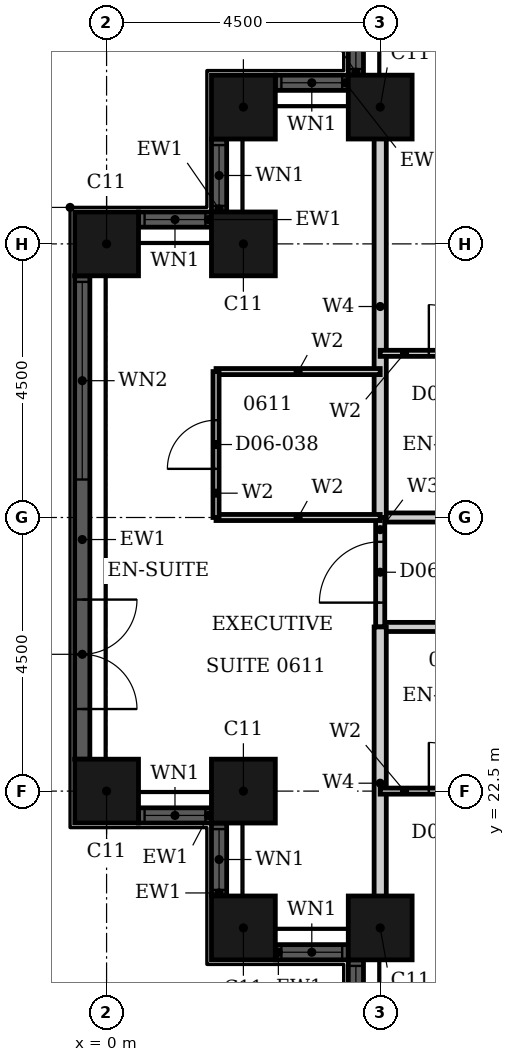
"""IFC4 building model, lengths in metres.
Left out: names, types, materials, properties, quantities, classifications, styles, units other than length and angle.
Written with IfcOpenShell. Run it as: python <this file> out.ifc"""

import sys

from ifc_helpers import new_model, si_unit, direction, frame, frame_2d, origin, origin_2d, place, context, subcontext, project, spatial, rectangle, hollow_rectangle, extrude, element, fill, save


model = new_model("IFC4")
c1 = context("Model", 3, precision=1e-05, world=origin(), true_north=direction((0.0, 1.0)))
c2 = subcontext(c1, "Body", "Model", "MODEL_VIEW")
j1 = project(units=[si_unit("LENGTHUNIT", "METRE"), si_unit("PLANEANGLEUNIT", "RADIAN")], contexts=[c1])
p1 = place(None, origin())
s1 = spatial("IfcSite", under=j1, at=p1, CompositionType="ELEMENT")
p2 = place(p1, origin())
s2 = spatial("IfcBuilding", under=s1, at=p2, CompositionType="ELEMENT")
p3 = place(p2, frame((0.0, 0.0, 33.6)))
s3 = spatial("IfcBuildingStorey", under=s2, at=p3, CompositionType="ELEMENT", Elevation=33.6)
for number, where, z_axis, x_axis in (
    (1, (4.5, 33.75, 0.0), (0.0, 0.0, 1.0), (1.0, 0.0, 0.0)),
    (2, (2.25, 33.75, 0.0), (0.0, 0.0, 1.0), (1.0, 0.0, 0.0)),
    (3, (2.25, 31.5, 0.0), (0.0, 0.0, 1.0), (1.0, 0.0, 0.0)),
    (4, (0.0, 31.5, 0.0), (0.0, 0.0, 1.0), (1.0, 0.0, 0.0)),
    (5, (0.0, 22.5, 0.0), (0.0, 0.0, 1.0), (1.0, 0.0, 0.0)),
    (6, (2.25, 22.5, 0.0), (0.0, 0.0, 1.0), (1.0, 0.0, 0.0)),
    (7, (2.25, 20.25, 0.0), (0.0, 0.0, 1.0), (1.0, 0.0, 0.0)),
    (8, (4.5, 20.25, 0.0), (0.0, 0.0, 1.0), (1.0, 0.0, 0.0)),
):
    element("IfcColumn", number, at=place(p3, frame(where, z_axis=z_axis, x_axis=x_axis)), inside=s3, PredefinedType="COLUMN", context=c2, shape_type="SweptSolid", body=[
        extrude(hollow_rectangle(XDim=1.05, YDim=1.05, WallThickness=0.034, at=origin_2d()), origin(), (0.0, 0.0, 1.0), 3.6),
    ])
p4 = place(p3, frame((4.1, 35.475, 0.0), z_axis=(0.0, 0.0, 1.0), x_axis=(0.0, -1.0, 0.0)))
e9 = element("IfcWall", 9, at=p4, inside=s3, PredefinedType="SOLIDWALL", context=c2, shape_type="SweptSolid", body=[
    extrude(rectangle(XDim=1.2, YDim=0.25, at=frame_2d((0.6, 0.0))), origin(), (0.0, 0.0, 1.0), 3.6),
])
p5 = place(p4, frame((0.1, 0.0, 0.9)))
e10 = element("IfcOpeningElement", 10, at=p5, cuts=e9, PredefinedType="OPENING", context=c2, shape_type="SweptSolid", body=[
    extrude(rectangle(XDim=1.0, YDim=2.08, at=frame_2d((0.5, 1.04))), frame((0.0, 0.135, 0.0), z_axis=(0.0, -1.0, 0.0), x_axis=(1.0, 0.0, 0.0)), (0.0, 0.0, 1.0), 0.27),
])
p6 = place(p3, frame((3.975, 34.15, 0.0), z_axis=(0.0, 0.0, 1.0), x_axis=(-1.0, 0.0, 0.0)))
e11 = element("IfcWall", 11, at=p6, inside=s3, PredefinedType="SOLIDWALL", context=c2, shape_type="SweptSolid", body=[
    extrude(rectangle(XDim=1.2, YDim=0.25, at=frame_2d((0.6, 0.0))), origin(), (0.0, 0.0, 1.0), 3.6),
])
p7 = place(p6, frame((0.1, 0.0, 0.9)))
e12 = element("IfcOpeningElement", 12, at=p7, cuts=e11, PredefinedType="OPENING", context=c2, shape_type="SweptSolid", body=[
    extrude(rectangle(XDim=1.0, YDim=2.08, at=frame_2d((0.5, 1.04))), frame((0.0, 0.135, 0.0), z_axis=(0.0, -1.0, 0.0), x_axis=(1.0, 0.0, 0.0)), (0.0, 0.0, 1.0), 0.27),
])
p8 = place(p3, frame((1.85, 33.225, 0.0), z_axis=(0.0, 0.0, 1.0), x_axis=(0.0, -1.0, 0.0)))
e13 = element("IfcWall", 13, at=p8, inside=s3, PredefinedType="SOLIDWALL", context=c2, shape_type="SweptSolid", body=[
    extrude(rectangle(XDim=1.2, YDim=0.25, at=frame_2d((0.6, 0.0))), origin(), (0.0, 0.0, 1.0), 3.6),
])
p9 = place(p8, frame((0.1, 0.0, 0.9)))
e14 = element("IfcOpeningElement", 14, at=p9, cuts=e13, PredefinedType="OPENING", context=c2, shape_type="SweptSolid", body=[
    extrude(rectangle(XDim=1.0, YDim=2.08, at=frame_2d((0.5, 1.04))), frame((0.0, 0.135, 0.0), z_axis=(0.0, -1.0, 0.0), x_axis=(1.0, 0.0, 0.0)), (0.0, 0.0, 1.0), 0.27),
])
p10 = place(p3, frame((1.725, 31.9, 0.0), z_axis=(0.0, 0.0, 1.0), x_axis=(-1.0, 0.0, 0.0)))
e15 = element("IfcWall", 15, at=p10, inside=s3, PredefinedType="SOLIDWALL", context=c2, shape_type="SweptSolid", body=[
    extrude(rectangle(XDim=1.2, YDim=0.25, at=frame_2d((0.6, 0.0))), origin(), (0.0, 0.0, 1.0), 3.6),
])
p11 = place(p10, frame((0.1, 0.0, 0.9)))
e16 = element("IfcOpeningElement", 16, at=p11, cuts=e15, PredefinedType="OPENING", context=c2, shape_type="SweptSolid", body=[
    extrude(rectangle(XDim=1.0, YDim=2.08, at=frame_2d((0.5, 1.04))), frame((0.0, 0.135, 0.0), z_axis=(0.0, -1.0, 0.0), x_axis=(1.0, 0.0, 0.0)), (0.0, 0.0, 1.0), 0.27),
])
p12 = place(p3, frame((-0.4, 30.975, 0.0), z_axis=(0.0, 0.0, 1.0), x_axis=(0.0, -1.0, 0.0)))
e17 = element("IfcWall", 17, at=p12, inside=s3, PredefinedType="SOLIDWALL", context=c2, shape_type="SweptSolid", body=[
    extrude(rectangle(XDim=7.95, YDim=0.25, at=frame_2d((3.975, 0.0))), origin(), (0.0, 0.0, 1.0), 3.6),
])
p13 = place(p12, frame((0.1, 0.0, 0.9)))
e18 = element("IfcOpeningElement", 18, at=p13, cuts=e17, PredefinedType="OPENING", context=c2, shape_type="SweptSolid", body=[
    extrude(rectangle(XDim=3.25, YDim=2.08, at=frame_2d((1.625, 1.04))), frame((0.0, 0.135, 0.0), z_axis=(0.0, -1.0, 0.0), x_axis=(1.0, 0.0, 0.0)), (0.0, 0.0, 1.0), 0.27),
])
p14 = place(p12, frame((5.325, 0.0, 0.0)))
e19 = element("IfcOpeningElement", 19, at=p14, cuts=e17, PredefinedType="OPENING", context=c2, shape_type="SweptSolid", body=[
    extrude(rectangle(XDim=1.8, YDim=2.4, at=frame_2d((0.9, 1.2))), frame((0.0, 0.135, 0.0), z_axis=(0.0, -1.0, 0.0), x_axis=(1.0, 0.0, 0.0)), (0.0, 0.0, 1.0), 0.27),
])
p15 = place(p3, frame((0.525, 22.1, 0.0), z_axis=(0.0, 0.0, 1.0), x_axis=(1.0, 0.0, 0.0)))
e20 = element("IfcWall", 20, at=p15, inside=s3, PredefinedType="SOLIDWALL", context=c2, shape_type="SweptSolid", body=[
    extrude(rectangle(XDim=1.2, YDim=0.25, at=frame_2d((0.6, 0.0))), origin(), (0.0, 0.0, 1.0), 3.6),
])
p16 = place(p15, frame((0.1, 0.0, 0.9)))
e21 = element("IfcOpeningElement", 21, at=p16, cuts=e20, PredefinedType="OPENING", context=c2, shape_type="SweptSolid", body=[
    extrude(rectangle(XDim=1.0, YDim=2.08, at=frame_2d((0.5, 1.04))), frame((0.0, 0.135, 0.0), z_axis=(0.0, -1.0, 0.0), x_axis=(1.0, 0.0, 0.0)), (0.0, 0.0, 1.0), 0.27),
])
p17 = place(p3, frame((1.85, 21.975, 0.0), z_axis=(0.0, 0.0, 1.0), x_axis=(0.0, -1.0, 0.0)))
e22 = element("IfcWall", 22, at=p17, inside=s3, PredefinedType="SOLIDWALL", context=c2, shape_type="SweptSolid", body=[
    extrude(rectangle(XDim=1.2, YDim=0.25, at=frame_2d((0.6, 0.0))), origin(), (0.0, 0.0, 1.0), 3.6),
])
p18 = place(p17, frame((0.1, 0.0, 0.9)))
e23 = element("IfcOpeningElement", 23, at=p18, cuts=e22, PredefinedType="OPENING", context=c2, shape_type="SweptSolid", body=[
    extrude(rectangle(XDim=1.0, YDim=2.08, at=frame_2d((0.5, 1.04))), frame((0.0, 0.135, 0.0), z_axis=(0.0, -1.0, 0.0), x_axis=(1.0, 0.0, 0.0)), (0.0, 0.0, 1.0), 0.27),
])
p19 = place(p3, frame((2.775, 19.85, 0.0), z_axis=(0.0, 0.0, 1.0), x_axis=(1.0, 0.0, 0.0)))
e24 = element("IfcWall", 24, at=p19, inside=s3, PredefinedType="SOLIDWALL", context=c2, shape_type="SweptSolid", body=[
    extrude(rectangle(XDim=1.2, YDim=0.25, at=frame_2d((0.6, 0.0))), origin(), (0.0, 0.0, 1.0), 3.6),
])
p20 = place(p19, frame((0.1, 0.0, 0.9)))
e25 = element("IfcOpeningElement", 25, at=p20, cuts=e24, PredefinedType="OPENING", context=c2, shape_type="SweptSolid", body=[
    extrude(rectangle(XDim=1.0, YDim=2.08, at=frame_2d((0.5, 1.04))), frame((0.0, 0.135, 0.0), z_axis=(0.0, -1.0, 0.0), x_axis=(1.0, 0.0, 0.0)), (0.0, 0.0, 1.0), 0.27),
])
p21 = place(p3, frame((4.1, 19.725, 0.0), z_axis=(0.0, 0.0, 1.0), x_axis=(0.0, -1.0, 0.0)))
e26 = element("IfcWall", 26, at=p21, inside=s3, PredefinedType="SOLIDWALL", context=c2, shape_type="SweptSolid", body=[
    extrude(rectangle(XDim=1.2, YDim=0.25, at=frame_2d((0.6, 0.0))), origin(), (0.0, 0.0, 1.0), 3.6),
])
p22 = place(p21, frame((0.1, 0.0, 0.9)))
e27 = element("IfcOpeningElement", 27, at=p22, cuts=e26, PredefinedType="OPENING", context=c2, shape_type="SweptSolid", body=[
    extrude(rectangle(XDim=1.0, YDim=2.08, at=frame_2d((0.5, 1.04))), frame((0.0, 0.135, 0.0), z_axis=(0.0, -1.0, 0.0), x_axis=(1.0, 0.0, 0.0)), (0.0, 0.0, 1.0), 0.27),
])
p23 = place(p3, frame((4.5, 25.2, 0.0), z_axis=(0.0, 0.0, 1.0), x_axis=(1.0, 0.0, 0.0)))
e28 = element("IfcWall", 28, at=p23, inside=s3, PredefinedType="PARTITIONING", context=c2, shape_type="SweptSolid", body=[
    extrude(rectangle(XDim=11.7, YDim=0.15, at=frame_2d((5.85, 0.0))), origin(), (0.0, 0.0, 1.0), 3.3),
])
p24 = place(p23, frame((6.25, 0.0, 0.0)))
e29 = element("IfcOpeningElement", 29, at=p24, cuts=e28, PredefinedType="OPENING", context=c2, shape_type="SweptSolid", body=[
    extrude(rectangle(XDim=1.0, YDim=2.1, at=frame_2d((0.5, 1.05))), frame((0.0, 0.085, 0.0), z_axis=(0.0, -1.0, 0.0), x_axis=(1.0, 0.0, 0.0)), (0.0, 0.0, 1.0), 0.17),
])
p25 = place(p3, frame((4.5, 27.0, 0.0), z_axis=(0.0, 0.0, 1.0), x_axis=(1.0, 0.0, 0.0)))
e30 = element("IfcWall", 30, at=p25, inside=s3, PredefinedType="PARTITIONING", context=c2, shape_type="SweptSolid", body=[
    extrude(rectangle(XDim=11.7, YDim=0.15, at=frame_2d((5.85, 0.0))), origin(), (0.0, 0.0, 1.0), 2.58),
])
p26 = place(p25, frame((6.25, 0.0, 0.0)))
e31 = element("IfcOpeningElement", 31, at=p26, cuts=e30, PredefinedType="OPENING", context=c2, shape_type="SweptSolid", body=[
    extrude(rectangle(XDim=1.0, YDim=2.1, at=frame_2d((0.5, 1.05))), frame((0.0, 0.085, 0.0), z_axis=(0.0, -1.0, 0.0), x_axis=(1.0, 0.0, 0.0)), (0.0, 0.0, 1.0), 0.17),
])
p27 = place(p3, frame((4.5, 25.2, 0.0), z_axis=(0.0, 0.0, 1.0), x_axis=(0.0, 1.0, 0.0)))
e32 = element("IfcWall", 32, at=p27, inside=s3, PredefinedType="PARTITIONING", context=c2, shape_type="SweptSolid", body=[
    extrude(rectangle(XDim=1.8, YDim=0.15, at=frame_2d((0.9, 0.0))), origin(), (0.0, 0.0, 1.0), 3.3),
])
p28 = place(p27, frame((0.4, 0.0, 0.0)))
e33 = element("IfcOpeningElement", 33, at=p28, cuts=e32, PredefinedType="OPENING", context=c2, shape_type="SweptSolid", body=[
    extrude(rectangle(XDim=1.0, YDim=2.1, at=frame_2d((0.5, 1.05))), frame((0.0, 0.085, 0.0), z_axis=(0.0, -1.0, 0.0), x_axis=(1.0, 0.0, 0.0)), (0.0, 0.0, 1.0), 0.17),
])
p29 = place(p3, frame((4.5, 27.0, 0.0), z_axis=(0.0, 0.0, 1.0), x_axis=(0.0, 1.0, 0.0)))
e34 = element("IfcWall", 34, at=p29, inside=s3, PredefinedType="PARTITIONING", context=c2, shape_type="SweptSolid", body=[
    extrude(rectangle(XDim=6.94, YDim=0.2, at=frame_2d((3.47, 0.0))), origin(), (0.0, 0.0, 1.0), 3.3),
])
p30 = place(p3, frame((4.5, 20.06, 0.0), z_axis=(0.0, 0.0, 1.0), x_axis=(0.0, 1.0, 0.0)))
e35 = element("IfcWall", 35, at=p30, inside=s3, PredefinedType="PARTITIONING", context=c2, shape_type="SweptSolid", body=[
    extrude(rectangle(XDim=5.14, YDim=0.2, at=frame_2d((2.57, 0.0))), origin(), (0.0, 0.0, 1.0), 3.3),
])
p31 = place(p3, frame((4.5, 22.5, 0.0), z_axis=(0.0, 0.0, 1.0), x_axis=(1.0, 0.0, 0.0)))
e36 = element("IfcWall", 36, at=p31, inside=s3, PredefinedType="PARTITIONING", context=c2, shape_type="SweptSolid", body=[
    extrude(rectangle(XDim=2.4, YDim=0.1, at=frame_2d((1.2, 0.0))), origin(), (0.0, 0.0, 1.0), 2.58),
])
p32 = place(p31, frame((0.8, 0.0, 0.0)))
e37 = element("IfcOpeningElement", 37, at=p32, cuts=e36, PredefinedType="OPENING", context=c2, shape_type="SweptSolid", body=[
    extrude(rectangle(XDim=0.8, YDim=2.1, at=frame_2d((0.4, 1.05))), frame((0.0, 0.06, 0.0), z_axis=(0.0, -1.0, 0.0), x_axis=(1.0, 0.0, 0.0)), (0.0, 0.0, 1.0), 0.12),
])
p33 = place(p3, frame((1.8, 27.0, 0.0), z_axis=(0.0, 0.0, 1.0), x_axis=(1.0, 0.0, 0.0)))
e38 = element("IfcWall", 38, at=p33, inside=s3, PredefinedType="PARTITIONING", context=c2, shape_type="SweptSolid", body=[
    extrude(rectangle(XDim=2.7, YDim=0.1, at=frame_2d((1.35, 0.0))), origin(), (0.0, 0.0, 1.0), 2.58),
])
p34 = place(p3, frame((1.8, 29.4, 0.0), z_axis=(0.0, 0.0, 1.0), x_axis=(1.0, 0.0, 0.0)))
e39 = element("IfcWall", 39, at=p34, inside=s3, PredefinedType="PARTITIONING", context=c2, shape_type="SweptSolid", body=[
    extrude(rectangle(XDim=2.7, YDim=0.1, at=frame_2d((1.35, 0.0))), origin(), (0.0, 0.0, 1.0), 3.3),
])
p35 = place(p3, frame((4.5, 29.7, 0.0), z_axis=(0.0, 0.0, 1.0), x_axis=(1.0, 0.0, 0.0)))
e40 = element("IfcWall", 40, at=p35, inside=s3, PredefinedType="PARTITIONING", context=c2, shape_type="SweptSolid", body=[
    extrude(rectangle(XDim=2.4, YDim=0.1, at=frame_2d((1.2, 0.0))), origin(), (0.0, 0.0, 1.0), 3.3),
])
p36 = place(p35, frame((0.8, 0.0, 0.0)))
e41 = element("IfcOpeningElement", 41, at=p36, cuts=e40, PredefinedType="OPENING", context=c2, shape_type="SweptSolid", body=[
    extrude(rectangle(XDim=0.8, YDim=2.1, at=frame_2d((0.4, 1.05))), frame((0.0, 0.06, 0.0), z_axis=(0.0, -1.0, 0.0), x_axis=(1.0, 0.0, 0.0)), (0.0, 0.0, 1.0), 0.12),
])
p37 = place(p3, frame((1.8, 27.0, 0.0), z_axis=(0.0, 0.0, 1.0), x_axis=(0.0, 1.0, 0.0)))
e42 = element("IfcWall", 42, at=p37, inside=s3, PredefinedType="PARTITIONING", context=c2, shape_type="SweptSolid", body=[
    extrude(rectangle(XDim=2.4, YDim=0.1, at=frame_2d((1.2, 0.0))), origin(), (0.0, 0.0, 1.0), 3.3),
])
p38 = place(p37, frame((0.8, 0.0, 0.0)))
e43 = element("IfcOpeningElement", 43, at=p38, cuts=e42, PredefinedType="OPENING", context=c2, shape_type="SweptSolid", body=[
    extrude(rectangle(XDim=0.8, YDim=2.1, at=frame_2d((0.4, 1.05))), frame((0.0, 0.06, 0.0), z_axis=(0.0, -1.0, 0.0), x_axis=(1.0, 0.0, 0.0)), (0.0, 0.0, 1.0), 0.12),
])
p39 = place(p5, origin())
e44 = element("IfcWindow", 44, at=p39, inside=s3, PartitioningType="SINGLE_PANEL", PredefinedType="WINDOW", context=c2, shape_type="SweptSolid", body=[
    extrude(rectangle(XDim=1.0, YDim=2.08, at=frame_2d((0.5, 1.04))), frame((0.0, 0.03, 0.0), z_axis=(0.0, -1.0, 0.0), x_axis=(1.0, 0.0, 0.0)), (0.0, 0.0, 1.0), 0.06),
])
fill(e10, e44)
p40 = place(p7, origin())
e45 = element("IfcWindow", 45, at=p40, inside=s3, PartitioningType="SINGLE_PANEL", PredefinedType="WINDOW", context=c2, shape_type="SweptSolid", body=[
    extrude(rectangle(XDim=1.0, YDim=2.08, at=frame_2d((0.5, 1.04))), frame((0.0, 0.03, 0.0), z_axis=(0.0, -1.0, 0.0), x_axis=(1.0, 0.0, 0.0)), (0.0, 0.0, 1.0), 0.06),
])
fill(e12, e45)
p41 = place(p9, origin())
e46 = element("IfcWindow", 46, at=p41, inside=s3, PartitioningType="SINGLE_PANEL", PredefinedType="WINDOW", context=c2, shape_type="SweptSolid", body=[
    extrude(rectangle(XDim=1.0, YDim=2.08, at=frame_2d((0.5, 1.04))), frame((0.0, 0.03, 0.0), z_axis=(0.0, -1.0, 0.0), x_axis=(1.0, 0.0, 0.0)), (0.0, 0.0, 1.0), 0.06),
])
fill(e14, e46)
p42 = place(p11, origin())
e47 = element("IfcWindow", 47, at=p42, inside=s3, PartitioningType="SINGLE_PANEL", PredefinedType="WINDOW", context=c2, shape_type="SweptSolid", body=[
    extrude(rectangle(XDim=1.0, YDim=2.08, at=frame_2d((0.5, 1.04))), frame((0.0, 0.03, 0.0), z_axis=(0.0, -1.0, 0.0), x_axis=(1.0, 0.0, 0.0)), (0.0, 0.0, 1.0), 0.06),
])
fill(e16, e47)
p43 = place(p13, origin())
e48 = element("IfcWindow", 48, at=p43, inside=s3, PartitioningType="SINGLE_PANEL", PredefinedType="WINDOW", context=c2, shape_type="SweptSolid", body=[
    extrude(rectangle(XDim=3.25, YDim=2.08, at=frame_2d((1.625, 1.04))), frame((0.0, 0.03, 0.0), z_axis=(0.0, -1.0, 0.0), x_axis=(1.0, 0.0, 0.0)), (0.0, 0.0, 1.0), 0.06),
])
fill(e18, e48)
p44 = place(p14, origin())
e49 = element("IfcDoor", 49, at=p44, inside=s3, OperationType="DOUBLE_DOOR_SINGLE_SWING", PredefinedType="DOOR", context=c2, shape_type="SweptSolid", body=[
    extrude(rectangle(XDim=1.8, YDim=2.4, at=frame_2d((0.9, 1.2))), frame((0.0, 0.025, 0.0), z_axis=(0.0, -1.0, 0.0), x_axis=(1.0, 0.0, 0.0)), (0.0, 0.0, 1.0), 0.05),
])
fill(e19, e49)
p45 = place(p16, origin())
e50 = element("IfcWindow", 50, at=p45, inside=s3, PartitioningType="SINGLE_PANEL", PredefinedType="WINDOW", context=c2, shape_type="SweptSolid", body=[
    extrude(rectangle(XDim=1.0, YDim=2.08, at=frame_2d((0.5, 1.04))), frame((0.0, 0.03, 0.0), z_axis=(0.0, -1.0, 0.0), x_axis=(1.0, 0.0, 0.0)), (0.0, 0.0, 1.0), 0.06),
])
fill(e21, e50)
p46 = place(p18, origin())
e51 = element("IfcWindow", 51, at=p46, inside=s3, PartitioningType="SINGLE_PANEL", PredefinedType="WINDOW", context=c2, shape_type="SweptSolid", body=[
    extrude(rectangle(XDim=1.0, YDim=2.08, at=frame_2d((0.5, 1.04))), frame((0.0, 0.03, 0.0), z_axis=(0.0, -1.0, 0.0), x_axis=(1.0, 0.0, 0.0)), (0.0, 0.0, 1.0), 0.06),
])
fill(e23, e51)
p47 = place(p20, origin())
e52 = element("IfcWindow", 52, at=p47, inside=s3, PartitioningType="SINGLE_PANEL", PredefinedType="WINDOW", context=c2, shape_type="SweptSolid", body=[
    extrude(rectangle(XDim=1.0, YDim=2.08, at=frame_2d((0.5, 1.04))), frame((0.0, 0.03, 0.0), z_axis=(0.0, -1.0, 0.0), x_axis=(1.0, 0.0, 0.0)), (0.0, 0.0, 1.0), 0.06),
])
fill(e25, e52)
p48 = place(p22, origin())
e53 = element("IfcWindow", 53, at=p48, inside=s3, PartitioningType="SINGLE_PANEL", PredefinedType="WINDOW", context=c2, shape_type="SweptSolid", body=[
    extrude(rectangle(XDim=1.0, YDim=2.08, at=frame_2d((0.5, 1.04))), frame((0.0, 0.03, 0.0), z_axis=(0.0, -1.0, 0.0), x_axis=(1.0, 0.0, 0.0)), (0.0, 0.0, 1.0), 0.06),
])
fill(e27, e53)
p49 = place(p32, origin())
e54 = element("IfcDoor", 54, at=p49, inside=s3, OperationType="SINGLE_SWING_RIGHT", PredefinedType="DOOR", context=c2, shape_type="SweptSolid", body=[
    extrude(rectangle(XDim=0.8, YDim=2.1, at=frame_2d((0.4, 1.05))), frame((0.0, 0.025, 0.0), z_axis=(0.0, -1.0, 0.0), x_axis=(1.0, 0.0, 0.0)), (0.0, 0.0, 1.0), 0.05),
])
fill(e37, e54)
p50 = place(p36, origin())
e55 = element("IfcDoor", 55, at=p50, inside=s3, OperationType="SINGLE_SWING_LEFT", PredefinedType="DOOR", context=c2, shape_type="SweptSolid", body=[
    extrude(rectangle(XDim=0.8, YDim=2.1, at=frame_2d((0.4, 1.05))), frame((0.0, 0.025, 0.0), z_axis=(0.0, -1.0, 0.0), x_axis=(1.0, 0.0, 0.0)), (0.0, 0.0, 1.0), 0.05),
])
fill(e41, e55)
p51 = place(p28, origin())
e56 = element("IfcDoor", 56, at=p51, inside=s3, OperationType="SINGLE_SWING_LEFT", PredefinedType="DOOR", context=c2, shape_type="SweptSolid", body=[
    extrude(rectangle(XDim=1.0, YDim=2.1, at=frame_2d((0.5, 1.05))), frame((0.0, 0.025, 0.0), z_axis=(0.0, -1.0, 0.0), x_axis=(1.0, 0.0, 0.0)), (0.0, 0.0, 1.0), 0.05),
])
fill(e33, e56)
p52 = place(p38, origin())
e57 = element("IfcDoor", 57, at=p52, inside=s3, OperationType="SINGLE_SWING_LEFT", PredefinedType="DOOR", context=c2, shape_type="SweptSolid", body=[
    extrude(rectangle(XDim=0.8, YDim=2.1, at=frame_2d((0.4, 1.05))), frame((0.0, 0.025, 0.0), z_axis=(0.0, -1.0, 0.0), x_axis=(1.0, 0.0, 0.0)), (0.0, 0.0, 1.0), 0.05),
])
fill(e43, e57)
save(model, sys.argv[1])
